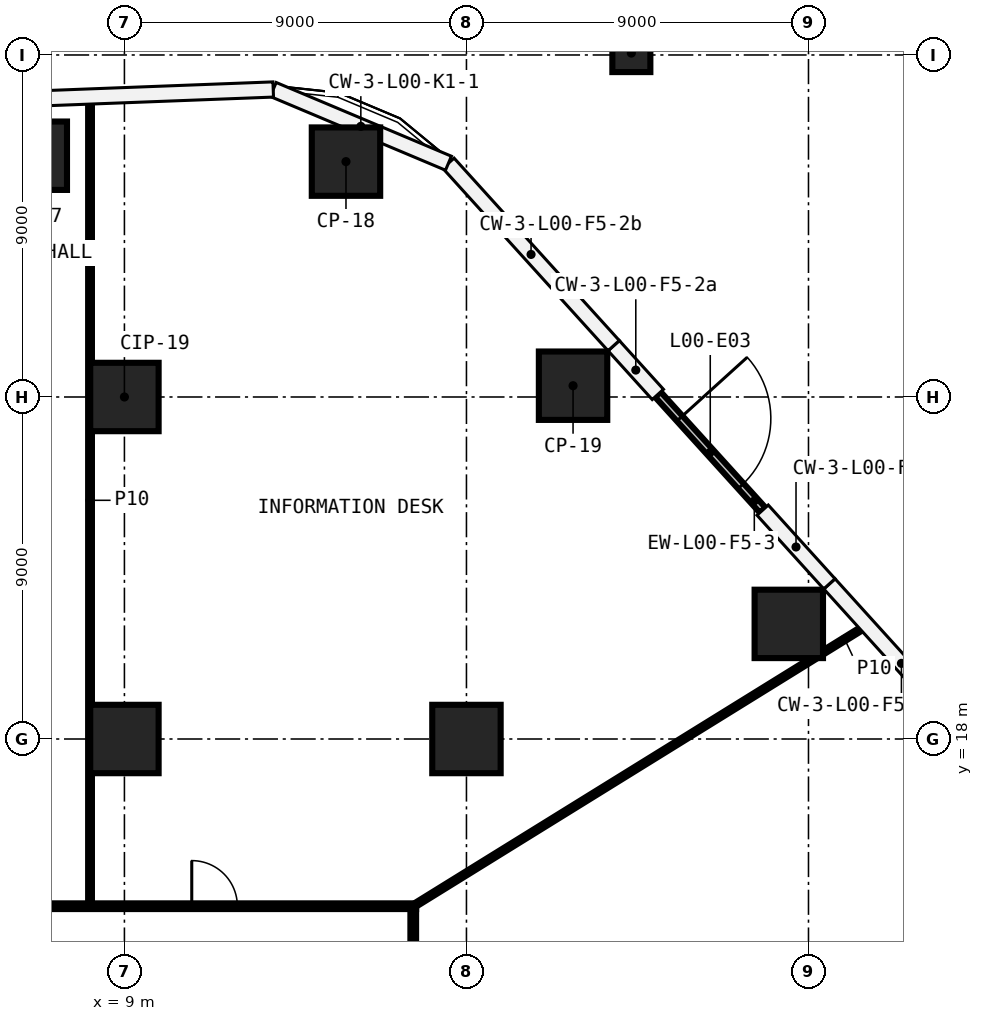
"""IFC4 building model, lengths in metres.
Left out: names, types, materials, properties, quantities, classifications, styles, units other than length and angle.
Written with IfcOpenShell. Run it as: python <this file> out.ifc"""

import sys

from ifc_helpers import new_model, si_unit, direction, frame, frame_2d, origin, origin_2d, place, context, subcontext, project, spatial, rectangle, extrude, element, fill, save


model = new_model("IFC4")
c1 = context("Model", 3, precision=1e-05, world=origin(), true_north=direction((0.0, 1.0)))
c2 = subcontext(c1, "Body", "Model", "MODEL_VIEW")
j1 = project(units=[si_unit("LENGTHUNIT", "METRE"), si_unit("PLANEANGLEUNIT", "RADIAN")], contexts=[c1])
p1 = place(None, origin())
s1 = spatial("IfcSite", under=j1, at=p1, CompositionType="ELEMENT")
p2 = place(p1, origin())
s2 = spatial("IfcBuilding", under=s1, at=p2, CompositionType="ELEMENT")
p3 = place(p2, origin())
s3 = spatial("IfcBuildingStorey", under=s2, at=p3, CompositionType="ELEMENT", Elevation=0.0)
for number, where, z_axis, x_axis in (
    (1, (6.589, 33.349, 0.0), (0.0, 0.0, 1.0), (1.0, 0.0, 0.0)),
    (2, (14.83, 33.194, 0.0), (0.0, 0.0, 1.0), (1.0, 0.0, 0.0)),
    (3, (20.805, 27.297, 0.0), (0.0, 0.0, 1.0), (1.0, 0.0, 0.0)),
    (4, (26.482, 21.029, 0.0), (0.0, 0.0, 1.0), (1.0, 0.0, 0.0)),
    (5, (9.0, 18.0, 0.0), (0.0, 0.0, 1.0), (1.0, 0.0, 0.0)),
    (6, (9.0, 27.0, 0.0), (0.0, 0.0, 1.0), (1.0, 0.0, 0.0)),
    (7, (18.0, 18.0, 0.0), (0.0, 0.0, 1.0), (1.0, 0.0, 0.0)),
):
    element("IfcColumn", number, at=place(p3, frame(where, z_axis=z_axis, x_axis=x_axis)), inside=s3, PredefinedType="COLUMN", context=c2, shape_type="SweptSolid", body=[
        extrude(rectangle(XDim=1.8, YDim=1.8, at=origin_2d()), origin(), (0.0, 0.0, 1.0), 8.55),
    ])
p4 = place(p3, frame((-16.675, 13.6, 0.0), z_axis=(0.0, 0.0, 1.0), x_axis=(1.0, 0.0, 0.0)))
e8 = element("IfcWall", 8, at=p4, inside=s3, PredefinedType="PARTITIONING", context=c2, shape_type="SweptSolid", body=[
    extrude(rectangle(XDim=33.35, YDim=0.15, at=frame_2d((16.675, 0.0))), origin(), (0.0, 0.0, 1.0), 8.55),
])
p5 = place(p4, frame((27.447, 0.0, 0.0)))
e9 = element("IfcOpeningElement", 9, at=p5, cuts=e8, PredefinedType="OPENING", context=c2, shape_type="SweptSolid", body=[
    extrude(rectangle(XDim=1.2, YDim=2.1, at=frame_2d((0.6, 1.05))), frame((0.0, 0.085, 0.0), z_axis=(0.0, -1.0, 0.0), x_axis=(1.0, 0.0, 0.0)), (0.0, 0.0, 1.0), 0.17),
])
p6 = place(p4, frame((19.346, 0.0, 0.0)))
e10 = element("IfcOpeningElement", 10, at=p6, cuts=e8, PredefinedType="OPENING", context=c2, shape_type="SweptSolid", body=[
    extrude(rectangle(XDim=1.2, YDim=2.1, at=frame_2d((0.6, 1.05))), frame((0.0, 0.085, 0.0), z_axis=(0.0, -1.0, 0.0), x_axis=(1.0, 0.0, 0.0)), (0.0, 0.0, 1.0), 0.17),
])
p7 = place(p3, frame((16.6, 13.6, 0.0), z_axis=(0.0, 0.0, 1.0), x_axis=(0.850261790898, 0.526360035469, 0.0)))
e11 = element("IfcWall", 11, at=p7, inside=s3, PredefinedType="PARTITIONING", context=c2, shape_type="SweptSolid", body=[
    extrude(rectangle(XDim=12.404, YDim=0.1, at=frame_2d((6.202, 0.0))), origin(), (0.0, 0.0, 1.0), 8.55),
])
p8 = place(p3, frame((27.382, 20.275, 0.0), z_axis=(0.0, 0.0, 1.0), x_axis=(0.850241855485, 0.526392237008, 0.0)))
e12 = element("IfcWall", 12, at=p8, inside=s3, PredefinedType="PARTITIONING", context=c2, shape_type="SweptSolid", body=[
    extrude(rectangle(XDim=1.34, YDim=0.1, at=frame_2d((0.67, 0.0))), origin(), (0.0, 0.0, 1.0), 8.55),
])
p9 = place(p3, frame((16.6, 13.525, 0.0), z_axis=(0.0, 0.0, 1.0), x_axis=(0.0, -1.0, 0.0)))
e13 = element("IfcWall", 13, at=p9, inside=s3, PredefinedType="PARTITIONING", context=c2, shape_type="SweptSolid", body=[
    extrude(rectangle(XDim=27.05, YDim=0.15, at=frame_2d((13.525, 0.0))), origin(), (0.0, 0.0, 1.0), 8.55),
])
p10 = place(p9, frame((17.482, 0.0, 0.0)))
e14 = element("IfcOpeningElement", 14, at=p10, cuts=e13, PredefinedType="OPENING", context=c2, shape_type="SweptSolid", body=[
    extrude(rectangle(XDim=1.2, YDim=2.1, at=frame_2d((0.6, 1.05))), frame((0.0, 0.085, 0.0), z_axis=(0.0, -1.0, 0.0), x_axis=(1.0, 0.0, 0.0)), (0.0, 0.0, 1.0), 0.17),
])
p11 = place(p3, frame((8.095, 13.675, 0.0), z_axis=(0.0, 0.0, 1.0), x_axis=(0.0, 1.0, 0.0)))
e15 = element("IfcWall", 15, at=p11, inside=s3, PredefinedType="PARTITIONING", context=c2, shape_type="SweptSolid", body=[
    extrude(rectangle(XDim=21.213, YDim=0.1, at=frame_2d((10.606, 0.0))), origin(), (0.0, 0.0, 1.0), 8.55),
])
p12 = place(p3, frame((23.036, 27.067, 0.0), z_axis=(0.0, 0.0, 1.0), x_axis=(0.671263414089, -0.741218880565, 0.0)))
e16 = element("IfcWall", 16, at=p12, inside=s3, PredefinedType="SOLIDWALL", context=c2, shape_type="SweptSolid", body=[
    extrude(rectangle(XDim=4.108, YDim=0.2, at=frame_2d((2.054, 0.0))), origin(), (0.0, 0.0, 1.0), 8.55),
])
p13 = place(p12, frame((0.854, 0.0, 0.0)))
e17 = element("IfcOpeningElement", 17, at=p13, cuts=e16, PredefinedType="OPENING", context=c2, shape_type="SweptSolid", body=[
    extrude(rectangle(XDim=2.4, YDim=2.4, at=frame_2d((1.2, 1.2))), frame((0.0, 0.11, 0.0), z_axis=(0.0, -1.0, 0.0), x_axis=(1.0, 0.0, 0.0)), (0.0, 0.0, 1.0), 0.22),
])
p14 = place(p3, frame((22.339, 36.05, -0.3), z_axis=(0.0, 0.0, 1.0), x_axis=(1.0, 0.0, 0.0)))
e18 = element("IfcColumn", 18, at=p14, inside=s3, PredefinedType="COLUMN", context=c2, shape_type="SweptSolid", body=[
    extrude(rectangle(XDim=1.0, YDim=1.0, at=origin_2d()), origin(), (0.0, 0.0, 1.0), 18.85),
])
p15 = place(p5, origin())
e19 = element("IfcDoor", 19, at=p15, inside=s3, OperationType="SINGLE_SWING_RIGHT", PredefinedType="DOOR", context=c2, shape_type="SweptSolid", body=[
    extrude(rectangle(XDim=1.2, YDim=2.1, at=frame_2d((0.6, 1.05))), frame((0.0, 0.025, 0.0), z_axis=(0.0, -1.0, 0.0), x_axis=(1.0, 0.0, 0.0)), (0.0, 0.0, 1.0), 0.05),
])
fill(e9, e19)
p16 = place(p13, origin())
e20 = element("IfcDoor", 20, at=p16, inside=s3, OperationType="SINGLE_SWING_LEFT", PredefinedType="DOOR", context=c2, shape_type="SweptSolid", body=[
    extrude(rectangle(XDim=2.4, YDim=2.4, at=frame_2d((1.2, 1.2))), frame((0.0, 0.025, 0.0), z_axis=(0.0, -1.0, 0.0), x_axis=(1.0, 0.0, 0.0)), (0.0, 0.0, 1.0), 0.05),
])
fill(e17, e20)
save(model, sys.argv[1])
